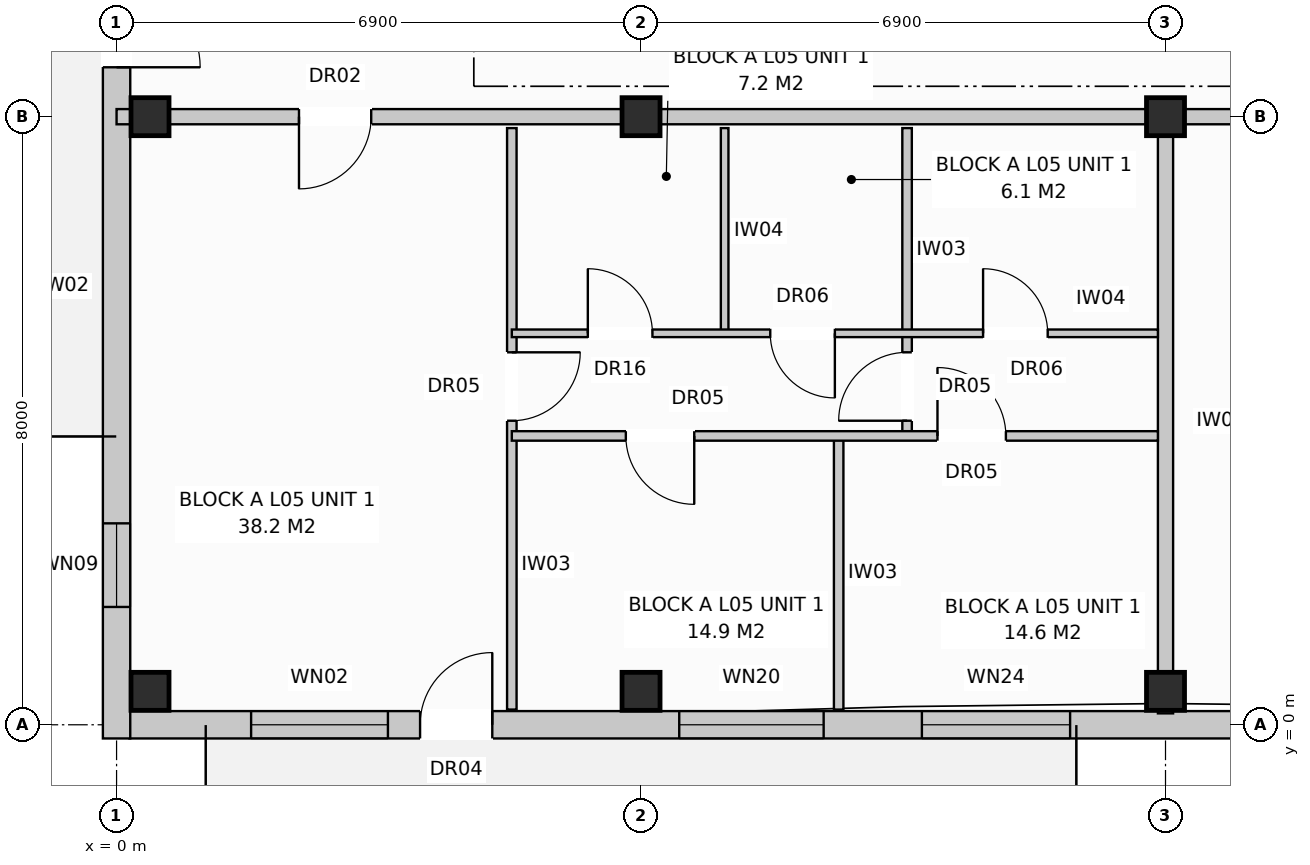
"""IFC4 building model, lengths in metres.
Left out: names, types, materials, properties, quantities, classifications, styles, units other than length and angle.
Written with IfcOpenShell. Run it as: python <this file> out.ifc"""

import sys

from ifc_helpers import new_model, si_unit, direction, frame, frame_2d, origin, origin_with_axes, origin_2d, place, context, subcontext, project, spatial, rectangle, extrude, element, fill, save


model = new_model("IFC4")
c1 = context("Model", 3, precision=1e-05, world=origin(), true_north=direction((0.0, 1.0)))
c2 = subcontext(c1, "Body", "Model", "MODEL_VIEW")
j1 = project(units=[si_unit("LENGTHUNIT", "METRE"), si_unit("PLANEANGLEUNIT", "RADIAN")], contexts=[c1])
p1 = place(None, origin())
s1 = spatial("IfcSite", under=j1, at=p1, CompositionType="ELEMENT")
p2 = place(p1, origin())
s2 = spatial("IfcBuilding", under=s1, at=p2, CompositionType="ELEMENT")
p3 = place(p2, frame((0.0, 0.0, 17.6)))
s3 = spatial("IfcBuildingStorey", under=s2, at=p3, CompositionType="ELEMENT", Elevation=17.6)
for number, where, z_axis, x_axis in (
    (1, (0.44, 0.44, 0.0), (0.0, 0.0, 1.0), (1.0, 0.0, 0.0)),
    (2, (0.44, 8.0, 0.0), (0.0, 0.0, 1.0), (1.0, 0.0, 0.0)),
    (3, (6.9, 0.44, 0.0), (0.0, 0.0, 1.0), (1.0, 0.0, 0.0)),
    (4, (6.9, 8.0, 0.0), (0.0, 0.0, 1.0), (1.0, 0.0, 0.0)),
    (5, (13.8, 0.44, 0.0), (0.0, 0.0, 1.0), (1.0, 0.0, 0.0)),
    (6, (13.8, 8.0, 0.0), (0.0, 0.0, 1.0), (1.0, 0.0, 0.0)),
):
    element("IfcColumn", number, at=place(p3, frame(where, z_axis=z_axis, x_axis=x_axis)), inside=s3, PredefinedType="COLUMN", context=c2, shape_type="SweptSolid", body=[
        extrude(rectangle(XDim=0.5, YDim=0.5, at=origin_2d()), origin(), (0.0, 0.0, 1.0), 3.2),
    ])
p4 = place(p3, frame((0.17, 0.0, 0.0), z_axis=(0.0, 0.0, 1.0), x_axis=(1.0, 0.0, 0.0)))
e7 = element("IfcWall", 7, at=p4, inside=s3, PredefinedType="STANDARD", context=c2, shape_type="SweptSolid", body=[
    extrude(rectangle(XDim=54.86, YDim=0.36, at=frame_2d((27.43, 0.0))), origin(), (0.0, 0.0, 1.0), 2.95),
])
p5 = place(p4, frame((3.823, 0.0, 0.0)))
e8 = element("IfcOpeningElement", 8, at=p5, cuts=e7, PredefinedType="OPENING", context=c2, shape_type="SweptSolid", body=[
    extrude(rectangle(XDim=0.95, YDim=2.1, at=frame_2d((0.475, 1.05))), frame((0.0, 0.192, 0.0), z_axis=(0.0, -1.0, 0.0), x_axis=(1.0, 0.0, 0.0)), (0.0, 0.0, 1.0), 0.384),
])
p6 = place(p4, frame((18.723, 0.0, 0.0)))
e9 = element("IfcOpeningElement", 9, at=p6, cuts=e7, PredefinedType="OPENING", context=c2, shape_type="SweptSolid", body=[
    extrude(rectangle(XDim=0.95, YDim=2.1, at=frame_2d((0.475, 1.05))), frame((0.0, 0.192, 0.0), z_axis=(0.0, -1.0, 0.0), x_axis=(1.0, 0.0, 0.0)), (0.0, 0.0, 1.0), 0.384),
])
p7 = place(p4, frame((29.123, 0.0, 0.0)))
e10 = element("IfcOpeningElement", 10, at=p7, cuts=e7, PredefinedType="OPENING", context=c2, shape_type="SweptSolid", body=[
    extrude(rectangle(XDim=0.95, YDim=2.1, at=frame_2d((0.475, 1.05))), frame((0.0, 0.192, 0.0), z_axis=(0.0, -1.0, 0.0), x_axis=(1.0, 0.0, 0.0)), (0.0, 0.0, 1.0), 0.384),
])
p8 = place(p4, frame((46.5, 0.0, 0.0)))
e11 = element("IfcOpeningElement", 11, at=p8, cuts=e7, PredefinedType="OPENING", context=c2, shape_type="SweptSolid", body=[
    extrude(rectangle(XDim=0.95, YDim=2.1, at=frame_2d((0.475, 1.05))), frame((0.0, 0.192, 0.0), z_axis=(0.0, -1.0, 0.0), x_axis=(1.0, 0.0, 0.0)), (0.0, 0.0, 1.0), 0.384),
])
p9 = place(p4, frame((1.6, 0.0, 0.8)))
e12 = element("IfcOpeningElement", 12, at=p9, cuts=e7, PredefinedType="OPENING", context=c2, shape_type="SweptSolid", body=[
    extrude(rectangle(XDim=1.8, YDim=1.7, at=frame_2d((0.9, 0.85))), frame((0.0, 0.192, 0.0), z_axis=(0.0, -1.0, 0.0), x_axis=(1.0, 0.0, 0.0)), (0.0, 0.0, 1.0), 0.384),
])
p10 = place(p4, frame((7.232, 0.0, 0.72)))
e13 = element("IfcOpeningElement", 13, at=p10, cuts=e7, PredefinedType="OPENING", context=c2, shape_type="SweptSolid", body=[
    extrude(rectangle(XDim=1.9, YDim=1.85, at=frame_2d((0.95, 0.925))), frame((0.0, 0.192, 0.0), z_axis=(0.0, -1.0, 0.0), x_axis=(1.0, 0.0, 0.0)), (0.0, 0.0, 1.0), 0.384),
])
p11 = place(p4, frame((10.425, 0.0, 0.8)))
e14 = element("IfcOpeningElement", 14, at=p11, cuts=e7, PredefinedType="OPENING", context=c2, shape_type="SweptSolid", body=[
    extrude(rectangle(XDim=1.95, YDim=1.65, at=frame_2d((0.975, 0.825))), frame((0.0, 0.192, 0.0), z_axis=(0.0, -1.0, 0.0), x_axis=(1.0, 0.0, 0.0)), (0.0, 0.0, 1.0), 0.384),
])
p12 = place(p4, frame((15.9, 0.0, 0.8)))
e15 = element("IfcOpeningElement", 15, at=p12, cuts=e7, PredefinedType="OPENING", context=c2, shape_type="SweptSolid", body=[
    extrude(rectangle(XDim=1.8, YDim=1.7, at=frame_2d((0.9, 0.85))), frame((0.0, 0.192, 0.0), z_axis=(0.0, -1.0, 0.0), x_axis=(1.0, 0.0, 0.0)), (0.0, 0.0, 1.0), 0.384),
])
p13 = place(p4, frame((21.55, 0.0, 0.72)))
e16 = element("IfcOpeningElement", 16, at=p13, cuts=e7, PredefinedType="OPENING", context=c2, shape_type="SweptSolid", body=[
    extrude(rectangle(XDim=1.9, YDim=1.85, at=frame_2d((0.95, 0.925))), frame((0.0, 0.192, 0.0), z_axis=(0.0, -1.0, 0.0), x_axis=(1.0, 0.0, 0.0)), (0.0, 0.0, 1.0), 0.384),
])
p14 = place(p4, frame((25.6, 0.0, 0.72)))
e17 = element("IfcOpeningElement", 17, at=p14, cuts=e7, PredefinedType="OPENING", context=c2, shape_type="SweptSolid", body=[
    extrude(rectangle(XDim=1.1, YDim=1.5, at=frame_2d((0.55, 0.75))), frame((0.0, 0.192, 0.0), z_axis=(0.0, -1.0, 0.0), x_axis=(1.0, 0.0, 0.0)), (0.0, 0.0, 1.0), 0.384),
])
p15 = place(p4, frame((31.4, 0.0, 0.8)))
e18 = element("IfcOpeningElement", 18, at=p15, cuts=e7, PredefinedType="OPENING", context=c2, shape_type="SweptSolid", body=[
    extrude(rectangle(XDim=1.8, YDim=1.7, at=frame_2d((0.9, 0.85))), frame((0.0, 0.192, 0.0), z_axis=(0.0, -1.0, 0.0), x_axis=(1.0, 0.0, 0.0)), (0.0, 0.0, 1.0), 0.384),
])
p16 = place(p4, frame((35.55, 0.0, 0.72)))
e19 = element("IfcOpeningElement", 19, at=p16, cuts=e7, PredefinedType="OPENING", context=c2, shape_type="SweptSolid", body=[
    extrude(rectangle(XDim=1.9, YDim=1.85, at=frame_2d((0.95, 0.925))), frame((0.0, 0.192, 0.0), z_axis=(0.0, -1.0, 0.0), x_axis=(1.0, 0.0, 0.0)), (0.0, 0.0, 1.0), 0.384),
])
p17 = place(p4, frame((39.25, 0.0, 0.72)))
e20 = element("IfcOpeningElement", 20, at=p17, cuts=e7, PredefinedType="OPENING", context=c2, shape_type="SweptSolid", body=[
    extrude(rectangle(XDim=1.1, YDim=1.5, at=frame_2d((0.55, 0.75))), frame((0.0, 0.192, 0.0), z_axis=(0.0, -1.0, 0.0), x_axis=(1.0, 0.0, 0.0)), (0.0, 0.0, 1.0), 0.384),
])
p18 = place(p4, frame((44.4, 0.0, 0.8)))
e21 = element("IfcOpeningElement", 21, at=p18, cuts=e7, PredefinedType="OPENING", context=c2, shape_type="SweptSolid", body=[
    extrude(rectangle(XDim=1.8, YDim=1.7, at=frame_2d((0.9, 0.85))), frame((0.0, 0.192, 0.0), z_axis=(0.0, -1.0, 0.0), x_axis=(1.0, 0.0, 0.0)), (0.0, 0.0, 1.0), 0.384),
])
p19 = place(p4, frame((49.15, 0.0, 0.72)))
e22 = element("IfcOpeningElement", 22, at=p19, cuts=e7, PredefinedType="OPENING", context=c2, shape_type="SweptSolid", body=[
    extrude(rectangle(XDim=1.9, YDim=1.85, at=frame_2d((0.95, 0.925))), frame((0.0, 0.192, 0.0), z_axis=(0.0, -1.0, 0.0), x_axis=(1.0, 0.0, 0.0)), (0.0, 0.0, 1.0), 0.384),
])
p20 = place(p4, frame((52.95, 0.0, 0.72)))
e23 = element("IfcOpeningElement", 23, at=p20, cuts=e7, PredefinedType="OPENING", context=c2, shape_type="SweptSolid", body=[
    extrude(rectangle(XDim=1.1, YDim=1.5, at=frame_2d((0.55, 0.75))), frame((0.0, 0.192, 0.0), z_axis=(0.0, -1.0, 0.0), x_axis=(1.0, 0.0, 0.0)), (0.0, 0.0, 1.0), 0.384),
])
p21 = place(p3, frame((0.0, -0.18, 0.0), z_axis=(0.0, 0.0, 1.0), x_axis=(0.0, 1.0, 0.0)))
e24 = element("IfcWall", 24, at=p21, inside=s3, PredefinedType="STANDARD", context=c2, shape_type="SweptSolid", body=[
    extrude(rectangle(XDim=18.76, YDim=0.36, at=frame_2d((9.38, 0.0))), origin(), (0.0, 0.0, 1.0), 2.95),
])
p22 = place(p21, frame((8.83, 0.0, 0.0)))
e25 = element("IfcOpeningElement", 25, at=p22, cuts=e24, PredefinedType="OPENING", context=c2, shape_type="SweptSolid", body=[
    extrude(rectangle(XDim=1.1, YDim=2.1, at=frame_2d((0.55, 1.05))), frame((0.0, 0.192, 0.0), z_axis=(0.0, -1.0, 0.0), x_axis=(1.0, 0.0, 0.0)), (0.0, 0.0, 1.0), 0.384),
])
p23 = place(p21, frame((1.73, 0.0, 0.72)))
e26 = element("IfcOpeningElement", 26, at=p23, cuts=e24, PredefinedType="OPENING", context=c2, shape_type="SweptSolid", body=[
    extrude(rectangle(XDim=1.1, YDim=1.5, at=frame_2d((0.55, 0.75))), frame((0.0, 0.192, 0.0), z_axis=(0.0, -1.0, 0.0), x_axis=(1.0, 0.0, 0.0)), (0.0, 0.0, 1.0), 0.384),
])
p24 = place(p21, frame((15.93, 0.0, 0.72)))
e27 = element("IfcOpeningElement", 27, at=p24, cuts=e24, PredefinedType="OPENING", context=c2, shape_type="SweptSolid", body=[
    extrude(rectangle(XDim=1.1, YDim=1.5, at=frame_2d((0.55, 0.75))), frame((0.0, 0.192, 0.0), z_axis=(0.0, -1.0, 0.0), x_axis=(1.0, 0.0, 0.0)), (0.0, 0.0, 1.0), 0.384),
])
p25 = place(p3, frame((13.8, 7.85, 0.0), z_axis=(0.0, 0.0, 1.0), x_axis=(0.0, -1.0, 0.0)))
e28 = element("IfcWall", 28, at=p25, inside=s3, PredefinedType="PARTITIONING", context=c2, shape_type="SweptSolid", body=[
    extrude(rectangle(XDim=7.7, YDim=0.2, at=frame_2d((3.85, 0.0))), origin(), (0.0, 0.0, 1.0), 2.95),
])
p26 = place(p3, frame((0.0, 8.0, 0.0), z_axis=(0.0, 0.0, 1.0), x_axis=(1.0, 0.0, 0.0)))
e29 = element("IfcWall", 29, at=p26, inside=s3, PredefinedType="PARTITIONING", context=c2, shape_type="SweptSolid", body=[
    extrude(rectangle(XDim=13.8, YDim=0.2, at=frame_2d((6.9, 0.0))), origin(), (0.0, 0.0, 1.0), 2.39),
])
p27 = place(p26, frame((2.4, 0.0, 0.0)))
e30 = element("IfcOpeningElement", 30, at=p27, cuts=e29, PredefinedType="OPENING", context=c2, shape_type="SweptSolid", body=[
    extrude(rectangle(XDim=0.95, YDim=2.15, at=frame_2d((0.475, 1.075))), frame((0.0, 0.112, 0.0), z_axis=(0.0, -1.0, 0.0), x_axis=(1.0, 0.0, 0.0)), (0.0, 0.0, 1.0), 0.224),
])
p28 = place(p3, frame((5.2, 7.85, 0.0), z_axis=(0.0, 0.0, 1.0), x_axis=(0.0, -1.0, 0.0)))
e31 = element("IfcWall", 31, at=p28, inside=s3, PredefinedType="PARTITIONING", context=c2, shape_type="SweptSolid", body=[
    extrude(rectangle(XDim=7.65, YDim=0.125, at=frame_2d((3.825, 0.0))), origin(), (0.0, 0.0, 1.0), 2.95),
])
p29 = place(p28, frame((2.95, 0.0, 0.0)))
e32 = element("IfcOpeningElement", 32, at=p29, cuts=e31, PredefinedType="OPENING", context=c2, shape_type="SweptSolid", body=[
    extrude(rectangle(XDim=0.9, YDim=2.1, at=frame_2d((0.45, 1.05))), frame((0.0, 0.074, 0.0), z_axis=(0.0, -1.0, 0.0), x_axis=(1.0, 0.0, 0.0)), (0.0, 0.0, 1.0), 0.149),
])
p30 = place(p3, frame((8.0, 7.85, 0.0), z_axis=(0.0, 0.0, 1.0), x_axis=(0.0, -1.0, 0.0)))
e33 = element("IfcWall", 33, at=p30, inside=s3, PredefinedType="PARTITIONING", context=c2, shape_type="SweptSolid", body=[
    extrude(rectangle(XDim=2.7, YDim=0.1, at=frame_2d((1.35, 0.0))), origin(), (0.0, 0.0, 1.0), 2.95),
])
p31 = place(p3, frame((10.4, 7.85, 0.0), z_axis=(0.0, 0.0, 1.0), x_axis=(0.0, -1.0, 0.0)))
e34 = element("IfcWall", 34, at=p31, inside=s3, PredefinedType="PARTITIONING", context=c2, shape_type="SweptSolid", body=[
    extrude(rectangle(XDim=4.05, YDim=0.125, at=frame_2d((2.025, 0.0))), origin(), (0.0, 0.0, 1.0), 2.95),
])
p32 = place(p31, frame((2.95, 0.0, 0.0)))
e35 = element("IfcOpeningElement", 35, at=p32, cuts=e34, PredefinedType="OPENING", context=c2, shape_type="SweptSolid", body=[
    extrude(rectangle(XDim=0.9, YDim=2.1, at=frame_2d((0.45, 1.05))), frame((0.0, 0.074, 0.0), z_axis=(0.0, -1.0, 0.0), x_axis=(1.0, 0.0, 0.0)), (0.0, 0.0, 1.0), 0.149),
])
p33 = place(p3, frame((9.5, 3.8, 0.0), z_axis=(0.0, 0.0, 1.0), x_axis=(0.0, -1.0, 0.0)))
e36 = element("IfcWall", 36, at=p33, inside=s3, PredefinedType="PARTITIONING", context=c2, shape_type="SweptSolid", body=[
    extrude(rectangle(XDim=3.6, YDim=0.125, at=frame_2d((1.8, 0.0))), origin(), (0.0, 0.0, 1.0), 2.95),
])
p34 = place(p3, frame((5.2, 5.15, 0.0), z_axis=(0.0, 0.0, 1.0), x_axis=(1.0, 0.0, 0.0)))
e37 = element("IfcWall", 37, at=p34, inside=s3, PredefinedType="PARTITIONING", context=c2, shape_type="SweptSolid", body=[
    extrude(rectangle(XDim=8.5, YDim=0.1, at=frame_2d((4.25, 0.0))), origin(), (0.0, 0.0, 1.0), 2.95),
])
p35 = place(p34, frame((1.0, 0.0, 0.0)))
e38 = element("IfcOpeningElement", 38, at=p35, cuts=e37, PredefinedType="OPENING", context=c2, shape_type="SweptSolid", body=[
    extrude(rectangle(XDim=0.85, YDim=2.1, at=frame_2d((0.425, 1.05))), frame((0.0, 0.062, 0.0), z_axis=(0.0, -1.0, 0.0), x_axis=(1.0, 0.0, 0.0)), (0.0, 0.0, 1.0), 0.124),
])
p36 = place(p34, frame((3.4, 0.0, 0.0)))
e39 = element("IfcOpeningElement", 39, at=p36, cuts=e37, PredefinedType="OPENING", context=c2, shape_type="SweptSolid", body=[
    extrude(rectangle(XDim=0.85, YDim=2.05, at=frame_2d((0.425, 1.025))), frame((0.0, 0.062, 0.0), z_axis=(0.0, -1.0, 0.0), x_axis=(1.0, 0.0, 0.0)), (0.0, 0.0, 1.0), 0.124),
])
p37 = place(p34, frame((6.2, 0.0, 0.0)))
e40 = element("IfcOpeningElement", 40, at=p37, cuts=e37, PredefinedType="OPENING", context=c2, shape_type="SweptSolid", body=[
    extrude(rectangle(XDim=0.85, YDim=2.05, at=frame_2d((0.425, 1.025))), frame((0.0, 0.062, 0.0), z_axis=(0.0, -1.0, 0.0), x_axis=(1.0, 0.0, 0.0)), (0.0, 0.0, 1.0), 0.124),
])
p38 = place(p3, frame((5.2, 3.8, 0.0), z_axis=(0.0, 0.0, 1.0), x_axis=(1.0, 0.0, 0.0)))
e41 = element("IfcWall", 41, at=p38, inside=s3, PredefinedType="PARTITIONING", context=c2, shape_type="SweptSolid", body=[
    extrude(rectangle(XDim=8.5, YDim=0.125, at=frame_2d((4.25, 0.0))), origin(), (0.0, 0.0, 1.0), 2.95),
])
p39 = place(p38, frame((1.5, 0.0, 0.0)))
e42 = element("IfcOpeningElement", 42, at=p39, cuts=e41, PredefinedType="OPENING", context=c2, shape_type="SweptSolid", body=[
    extrude(rectangle(XDim=0.9, YDim=2.1, at=frame_2d((0.45, 1.05))), frame((0.0, 0.074, 0.0), z_axis=(0.0, -1.0, 0.0), x_axis=(1.0, 0.0, 0.0)), (0.0, 0.0, 1.0), 0.149),
])
p40 = place(p38, frame((5.6, 0.0, 0.0)))
e43 = element("IfcOpeningElement", 43, at=p40, cuts=e41, PredefinedType="OPENING", context=c2, shape_type="SweptSolid", body=[
    extrude(rectangle(XDim=0.9, YDim=2.1, at=frame_2d((0.45, 1.05))), frame((0.0, 0.074, 0.0), z_axis=(0.0, -1.0, 0.0), x_axis=(1.0, 0.0, 0.0)), (0.0, 0.0, 1.0), 0.149),
])
p41 = place(p3, frame((13.8, 8.0, 0.0), z_axis=(0.0, 0.0, 1.0), x_axis=(1.0, 0.0, 0.0)))
e44 = element("IfcWall", 44, at=p41, inside=s3, PredefinedType="PARTITIONING", context=c2, shape_type="SweptSolid", body=[
    extrude(rectangle(XDim=20.7, YDim=0.2, at=frame_2d((10.35, 0.0))), origin(), (0.0, 0.0, 1.0), 2.39),
])
p42 = place(p41, frame((2.4, 0.0, 0.0)))
e45 = element("IfcOpeningElement", 45, at=p42, cuts=e44, PredefinedType="OPENING", context=c2, shape_type="SweptSolid", body=[
    extrude(rectangle(XDim=0.95, YDim=2.15, at=frame_2d((0.475, 1.075))), frame((0.0, 0.112, 0.0), z_axis=(0.0, -1.0, 0.0), x_axis=(1.0, 0.0, 0.0)), (0.0, 0.0, 1.0), 0.224),
])
p43 = place(p5, origin_with_axes())
e46 = element("IfcDoor", 46, at=p43, inside=s3, OperationType="SINGLE_SWING_RIGHT", PredefinedType="DOOR", context=c2, shape_type="SweptSolid", body=[
    extrude(rectangle(XDim=0.95, YDim=2.1, at=frame_2d((0.475, 1.05))), frame((0.0, 0.025, 0.0), z_axis=(0.0, -1.0, 0.0), x_axis=(1.0, 0.0, 0.0)), (0.0, 0.0, 1.0), 0.05),
])
fill(e8, e46)
p44 = place(p9, origin_with_axes())
e47 = element("IfcWindow", 47, at=p44, inside=s3, PartitioningType="SINGLE_PANEL", PredefinedType="WINDOW", context=c2, shape_type="SweptSolid", body=[
    extrude(rectangle(XDim=1.8, YDim=1.7, at=frame_2d((0.9, 0.85))), frame((0.0, 0.03, 0.0), z_axis=(0.0, -1.0, 0.0), x_axis=(1.0, 0.0, 0.0)), (0.0, 0.0, 1.0), 0.06),
])
fill(e12, e47)
p45 = place(p10, origin_with_axes())
e48 = element("IfcWindow", 48, at=p45, inside=s3, PartitioningType="SINGLE_PANEL", PredefinedType="WINDOW", context=c2, shape_type="SweptSolid", body=[
    extrude(rectangle(XDim=1.9, YDim=1.85, at=frame_2d((0.95, 0.925))), frame((0.0, 0.03, 0.0), z_axis=(0.0, -1.0, 0.0), x_axis=(1.0, 0.0, 0.0)), (0.0, 0.0, 1.0), 0.06),
])
fill(e13, e48)
p46 = place(p11, origin_with_axes())
e49 = element("IfcWindow", 49, at=p46, inside=s3, PartitioningType="SINGLE_PANEL", PredefinedType="WINDOW", context=c2, shape_type="SweptSolid", body=[
    extrude(rectangle(XDim=1.95, YDim=1.65, at=frame_2d((0.975, 0.825))), frame((0.0, 0.03, 0.0), z_axis=(0.0, -1.0, 0.0), x_axis=(1.0, 0.0, 0.0)), (0.0, 0.0, 1.0), 0.06),
])
fill(e14, e49)
p47 = place(p22, frame((1.1, 0.0, 0.0), z_axis=(0.0, 0.0, 1.0), x_axis=(-1.0, 0.0, 0.0)))
e50 = element("IfcDoor", 50, at=p47, inside=s3, OperationType="SINGLE_SWING_LEFT", PredefinedType="DOOR", context=c2, shape_type="SweptSolid", body=[
    extrude(rectangle(XDim=1.1, YDim=2.1, at=frame_2d((0.55, 1.05))), frame((0.0, 0.025, 0.0), z_axis=(0.0, -1.0, 0.0), x_axis=(1.0, 0.0, 0.0)), (0.0, 0.0, 1.0), 0.05),
])
fill(e25, e50)
p48 = place(p23, origin_with_axes())
e51 = element("IfcWindow", 51, at=p48, inside=s3, PartitioningType="SINGLE_PANEL", PredefinedType="WINDOW", context=c2, shape_type="SweptSolid", body=[
    extrude(rectangle(XDim=1.1, YDim=1.5, at=frame_2d((0.55, 0.75))), frame((0.0, 0.03, 0.0), z_axis=(0.0, -1.0, 0.0), x_axis=(1.0, 0.0, 0.0)), (0.0, 0.0, 1.0), 0.06),
])
fill(e26, e51)
p49 = place(p27, frame((0.95, 0.0, 0.0), z_axis=(0.0, 0.0, 1.0), x_axis=(-1.0, 0.0, 0.0)))
e52 = element("IfcDoor", 52, at=p49, inside=s3, OperationType="SINGLE_SWING_LEFT", PredefinedType="DOOR", context=c2, shape_type="SweptSolid", body=[
    extrude(rectangle(XDim=0.95, YDim=2.15, at=frame_2d((0.475, 1.075))), frame((0.0, 0.025, 0.0), z_axis=(0.0, -1.0, 0.0), x_axis=(1.0, 0.0, 0.0)), (0.0, 0.0, 1.0), 0.05),
])
fill(e30, e52)
p50 = place(p29, origin_with_axes())
e53 = element("IfcDoor", 53, at=p50, inside=s3, OperationType="SINGLE_SWING_LEFT", PredefinedType="DOOR", context=c2, shape_type="SweptSolid", body=[
    extrude(rectangle(XDim=0.9, YDim=2.1, at=frame_2d((0.45, 1.05))), frame((0.0, 0.025, 0.0), z_axis=(0.0, -1.0, 0.0), x_axis=(1.0, 0.0, 0.0)), (0.0, 0.0, 1.0), 0.05),
])
fill(e32, e53)
p51 = place(p32, frame((0.9, 0.0, 0.0), z_axis=(0.0, 0.0, 1.0), x_axis=(-1.0, 0.0, 0.0)))
e54 = element("IfcDoor", 54, at=p51, inside=s3, OperationType="SINGLE_SWING_RIGHT", PredefinedType="DOOR", context=c2, shape_type="SweptSolid", body=[
    extrude(rectangle(XDim=0.9, YDim=2.1, at=frame_2d((0.45, 1.05))), frame((0.0, 0.025, 0.0), z_axis=(0.0, -1.0, 0.0), x_axis=(1.0, 0.0, 0.0)), (0.0, 0.0, 1.0), 0.05),
])
fill(e35, e54)
p52 = place(p35, origin_with_axes())
e55 = element("IfcDoor", 55, at=p52, inside=s3, OperationType="SINGLE_SWING_LEFT", PredefinedType="DOOR", context=c2, shape_type="SweptSolid", body=[
    extrude(rectangle(XDim=0.85, YDim=2.1, at=frame_2d((0.425, 1.05))), frame((0.0, 0.025, 0.0), z_axis=(0.0, -1.0, 0.0), x_axis=(1.0, 0.0, 0.0)), (0.0, 0.0, 1.0), 0.05),
])
fill(e38, e55)
p53 = place(p36, frame((0.85, 0.0, 0.0), z_axis=(0.0, 0.0, 1.0), x_axis=(-1.0, 0.0, 0.0)))
e56 = element("IfcDoor", 56, at=p53, inside=s3, OperationType="SINGLE_SWING_RIGHT", PredefinedType="DOOR", context=c2, shape_type="SweptSolid", body=[
    extrude(rectangle(XDim=0.85, YDim=2.05, at=frame_2d((0.425, 1.025))), frame((0.0, 0.025, 0.0), z_axis=(0.0, -1.0, 0.0), x_axis=(1.0, 0.0, 0.0)), (0.0, 0.0, 1.0), 0.05),
])
fill(e39, e56)
p54 = place(p37, origin_with_axes())
e57 = element("IfcDoor", 57, at=p54, inside=s3, OperationType="SINGLE_SWING_LEFT", PredefinedType="DOOR", context=c2, shape_type="SweptSolid", body=[
    extrude(rectangle(XDim=0.85, YDim=2.05, at=frame_2d((0.425, 1.025))), frame((0.0, 0.025, 0.0), z_axis=(0.0, -1.0, 0.0), x_axis=(1.0, 0.0, 0.0)), (0.0, 0.0, 1.0), 0.05),
])
fill(e40, e57)
p55 = place(p39, frame((0.9, 0.0, 0.0), z_axis=(0.0, 0.0, 1.0), x_axis=(-1.0, 0.0, 0.0)))
e58 = element("IfcDoor", 58, at=p55, inside=s3, OperationType="SINGLE_SWING_RIGHT", PredefinedType="DOOR", context=c2, shape_type="SweptSolid", body=[
    extrude(rectangle(XDim=0.9, YDim=2.1, at=frame_2d((0.45, 1.05))), frame((0.0, 0.025, 0.0), z_axis=(0.0, -1.0, 0.0), x_axis=(1.0, 0.0, 0.0)), (0.0, 0.0, 1.0), 0.05),
])
fill(e42, e58)
p56 = place(p40, origin_with_axes())
e59 = element("IfcDoor", 59, at=p56, inside=s3, OperationType="SINGLE_SWING_LEFT", PredefinedType="DOOR", context=c2, shape_type="SweptSolid", body=[
    extrude(rectangle(XDim=0.9, YDim=2.1, at=frame_2d((0.45, 1.05))), frame((0.0, 0.025, 0.0), z_axis=(0.0, -1.0, 0.0), x_axis=(1.0, 0.0, 0.0)), (0.0, 0.0, 1.0), 0.05),
])
fill(e43, e59)
save(model, sys.argv[1])
